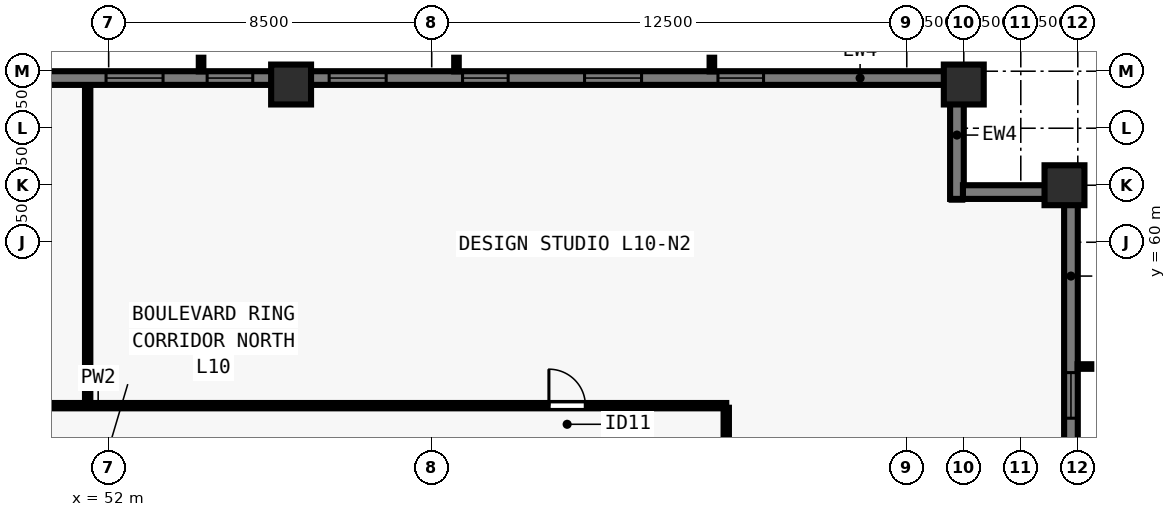
"""IFC4 building model, lengths in metres.
Left out: names, types, materials, properties, quantities, classifications, styles, units other than length and angle.
Written with IfcOpenShell. Run it as: python <this file> out.ifc"""

import sys

from ifc_helpers import new_model, si_unit, direction, frame, frame_2d, origin, origin_2d, place, context, subcontext, project, spatial, rectangle, extrude, element, fill, save


model = new_model("IFC4")
c1 = context("Model", 3, precision=1e-05, world=origin(), true_north=direction((0.0, 1.0)))
c2 = subcontext(c1, "Body", "Model", "MODEL_VIEW")
j1 = project(units=[si_unit("LENGTHUNIT", "METRE"), si_unit("PLANEANGLEUNIT", "RADIAN")], contexts=[c1])
p1 = place(None, origin())
s1 = spatial("IfcSite", under=j1, at=p1, CompositionType="ELEMENT")
p2 = place(p1, origin())
s2 = spatial("IfcBuilding", under=s1, at=p2, CompositionType="ELEMENT")
p3 = place(p2, frame((0.0, 0.0, 41.0)))
s3 = spatial("IfcBuildingStorey", under=s2, at=p3, CompositionType="ELEMENT", Elevation=41.0)
for number, where, z_axis, x_axis in (
    (1, (77.15, 61.5, 0.0), (0.0, 0.0, 1.0), (0.0, 1.0, 0.0)),
    (2, (74.5, 64.15, 0.0), (0.0, 0.0, 1.0), (1.0, 0.0, 0.0)),
    (3, (56.8, 64.15, 0.0), (0.0, 0.0, 1.0), (1.0, 0.0, 0.0)),
):
    element("IfcColumn", number, at=place(p3, frame(where, z_axis=z_axis, x_axis=x_axis)), inside=s3, PredefinedType="COLUMN", context=c2, shape_type="SweptSolid", body=[
        extrude(rectangle(XDim=1.05, YDim=1.05, at=origin_2d()), origin(), (0.0, 0.0, 1.0), 3.5),
    ])
p4 = place(p3, frame((29.5, 64.32, 0.0), z_axis=(0.0, 0.0, 1.0), x_axis=(1.0, 0.0, 0.0)))
e4 = element("IfcWall", 4, at=p4, inside=s3, PredefinedType="SOLIDWALL", context=c2, shape_type="SweptSolid", body=[
    extrude(rectangle(XDim=44.662, YDim=0.36, at=frame_2d((22.331, 0.0))), origin(), (0.0, 0.0, 1.0), 3.28),
])
p5 = place(p4, frame((4.93, 0.0, 0.8)))
e5 = element("IfcOpeningElement", 5, at=p5, cuts=e4, PredefinedType="OPENING", context=c2, shape_type="SweptSolid", body=[
    extrude(rectangle(XDim=1.2, YDim=1.544, at=frame_2d((0.6, 0.772))), frame((0.0, 0.19, 0.0), z_axis=(0.0, -1.0, 0.0), x_axis=(1.0, 0.0, 0.0)), (0.0, 0.0, 1.0), 0.38),
])
p6 = place(p4, frame((8.14, 0.0, 0.8)))
e6 = element("IfcOpeningElement", 6, at=p6, cuts=e4, PredefinedType="OPENING", context=c2, shape_type="SweptSolid", body=[
    extrude(rectangle(XDim=1.5, YDim=1.544, at=frame_2d((0.75, 0.772))), frame((0.0, 0.19, 0.0), z_axis=(0.0, -1.0, 0.0), x_axis=(1.0, 0.0, 0.0)), (0.0, 0.0, 1.0), 0.38),
])
p7 = place(p4, frame((11.65, 0.0, 0.8)))
e7 = element("IfcOpeningElement", 7, at=p7, cuts=e4, PredefinedType="OPENING", context=c2, shape_type="SweptSolid", body=[
    extrude(rectangle(XDim=1.2, YDim=1.544, at=frame_2d((0.6, 0.772))), frame((0.0, 0.19, 0.0), z_axis=(0.0, -1.0, 0.0), x_axis=(1.0, 0.0, 0.0)), (0.0, 0.0, 1.0), 0.38),
])
p8 = place(p4, frame((14.861, 0.0, 0.8)))
e8 = element("IfcOpeningElement", 8, at=p8, cuts=e4, PredefinedType="OPENING", context=c2, shape_type="SweptSolid", body=[
    extrude(rectangle(XDim=1.5, YDim=1.544, at=frame_2d((0.75, 0.772))), frame((0.0, 0.19, 0.0), z_axis=(0.0, -1.0, 0.0), x_axis=(1.0, 0.0, 0.0)), (0.0, 0.0, 1.0), 0.38),
])
p9 = place(p4, frame((18.821, 0.0, 0.8)))
e9 = element("IfcOpeningElement", 9, at=p9, cuts=e4, PredefinedType="OPENING", context=c2, shape_type="SweptSolid", body=[
    extrude(rectangle(XDim=1.2, YDim=1.544, at=frame_2d((0.6, 0.772))), frame((0.0, 0.19, 0.0), z_axis=(0.0, -1.0, 0.0), x_axis=(1.0, 0.0, 0.0)), (0.0, 0.0, 1.0), 0.38),
])
p10 = place(p4, frame((22.431, 0.0, 0.8)))
e10 = element("IfcOpeningElement", 10, at=p10, cuts=e4, PredefinedType="OPENING", context=c2, shape_type="SweptSolid", body=[
    extrude(rectangle(XDim=1.5, YDim=1.544, at=frame_2d((0.75, 0.772))), frame((0.0, 0.19, 0.0), z_axis=(0.0, -1.0, 0.0), x_axis=(1.0, 0.0, 0.0)), (0.0, 0.0, 1.0), 0.38),
])
p11 = place(p4, frame((25.091, 0.0, 0.8)))
e11 = element("IfcOpeningElement", 11, at=p11, cuts=e4, PredefinedType="OPENING", context=c2, shape_type="SweptSolid", body=[
    extrude(rectangle(XDim=1.2, YDim=1.544, at=frame_2d((0.6, 0.772))), frame((0.0, 0.19, 0.0), z_axis=(0.0, -1.0, 0.0), x_axis=(1.0, 0.0, 0.0)), (0.0, 0.0, 1.0), 0.38),
])
p12 = place(p4, frame((28.302, 0.0, 0.8)))
e12 = element("IfcOpeningElement", 12, at=p12, cuts=e4, PredefinedType="OPENING", context=c2, shape_type="SweptSolid", body=[
    extrude(rectangle(XDim=1.5, YDim=1.544, at=frame_2d((0.75, 0.772))), frame((0.0, 0.19, 0.0), z_axis=(0.0, -1.0, 0.0), x_axis=(1.0, 0.0, 0.0)), (0.0, 0.0, 1.0), 0.38),
])
p13 = place(p4, frame((31.812, 0.0, 0.8)))
e13 = element("IfcOpeningElement", 13, at=p13, cuts=e4, PredefinedType="OPENING", context=c2, shape_type="SweptSolid", body=[
    extrude(rectangle(XDim=1.2, YDim=1.544, at=frame_2d((0.6, 0.772))), frame((0.0, 0.19, 0.0), z_axis=(0.0, -1.0, 0.0), x_axis=(1.0, 0.0, 0.0)), (0.0, 0.0, 1.0), 0.38),
])
p14 = place(p4, frame((35.022, 0.0, 0.8)))
e14 = element("IfcOpeningElement", 14, at=p14, cuts=e4, PredefinedType="OPENING", context=c2, shape_type="SweptSolid", body=[
    extrude(rectangle(XDim=1.5, YDim=1.544, at=frame_2d((0.75, 0.772))), frame((0.0, 0.19, 0.0), z_axis=(0.0, -1.0, 0.0), x_axis=(1.0, 0.0, 0.0)), (0.0, 0.0, 1.0), 0.38),
])
p15 = place(p4, frame((38.532, 0.0, 0.8)))
e15 = element("IfcOpeningElement", 15, at=p15, cuts=e4, PredefinedType="OPENING", context=c2, shape_type="SweptSolid", body=[
    extrude(rectangle(XDim=1.2, YDim=1.544, at=frame_2d((0.6, 0.772))), frame((0.0, 0.19, 0.0), z_axis=(0.0, -1.0, 0.0), x_axis=(1.0, 0.0, 0.0)), (0.0, 0.0, 1.0), 0.38),
])
p16 = place(p3, frame((74.32, 64.5, 0.0), z_axis=(0.0, 0.0, 1.0), x_axis=(0.0, -1.0, 0.0)))
e16 = element("IfcWall", 16, at=p16, inside=s3, PredefinedType="SOLIDWALL", context=c2, shape_type="SweptSolid", body=[
    extrude(rectangle(XDim=3.36, YDim=0.36, at=frame_2d((1.68, 0.0))), origin(), (0.0, 0.0, 1.0), 3.28),
])
p17 = place(p3, frame((74.478, 61.32, 0.0), z_axis=(0.0, 0.0, 1.0), x_axis=(1.0, 0.0, 0.0)))
e17 = element("IfcWall", 17, at=p17, inside=s3, PredefinedType="SOLIDWALL", context=c2, shape_type="SweptSolid", body=[
    extrude(rectangle(XDim=2.684, YDim=0.36, at=frame_2d((1.342, 0.0))), origin(), (0.0, 0.0, 1.0), 3.28),
])
p18 = place(p3, frame((77.32, 61.5, 0.0), z_axis=(0.0, 0.0, 1.0), x_axis=(0.0, -1.0, 0.0)))
e18 = element("IfcWall", 18, at=p18, inside=s3, PredefinedType="SOLIDWALL", context=c2, shape_type="SweptSolid", body=[
    extrude(rectangle(XDim=44.662, YDim=0.36, at=frame_2d((22.331, 0.0))), origin(), (0.0, 0.0, 1.0), 3.28),
])
p19 = place(p18, frame((4.93, 0.0, 0.8)))
e19 = element("IfcOpeningElement", 19, at=p19, cuts=e18, PredefinedType="OPENING", context=c2, shape_type="SweptSolid", body=[
    extrude(rectangle(XDim=1.2, YDim=1.544, at=frame_2d((0.6, 0.772))), frame((0.0, 0.19, 0.0), z_axis=(0.0, -1.0, 0.0), x_axis=(1.0, 0.0, 0.0)), (0.0, 0.0, 1.0), 0.38),
])
p20 = place(p18, frame((8.14, 0.0, 0.8)))
e20 = element("IfcOpeningElement", 20, at=p20, cuts=e18, PredefinedType="OPENING", context=c2, shape_type="SweptSolid", body=[
    extrude(rectangle(XDim=1.5, YDim=1.544, at=frame_2d((0.75, 0.772))), frame((0.0, 0.19, 0.0), z_axis=(0.0, -1.0, 0.0), x_axis=(1.0, 0.0, 0.0)), (0.0, 0.0, 1.0), 0.38),
])
p21 = place(p18, frame((11.65, 0.0, 0.8)))
e21 = element("IfcOpeningElement", 21, at=p21, cuts=e18, PredefinedType="OPENING", context=c2, shape_type="SweptSolid", body=[
    extrude(rectangle(XDim=1.2, YDim=1.544, at=frame_2d((0.6, 0.772))), frame((0.0, 0.19, 0.0), z_axis=(0.0, -1.0, 0.0), x_axis=(1.0, 0.0, 0.0)), (0.0, 0.0, 1.0), 0.38),
])
p22 = place(p18, frame((15.311, 0.0, 0.8)))
e22 = element("IfcOpeningElement", 22, at=p22, cuts=e18, PredefinedType="OPENING", context=c2, shape_type="SweptSolid", body=[
    extrude(rectangle(XDim=1.5, YDim=1.544, at=frame_2d((0.75, 0.772))), frame((0.0, 0.19, 0.0), z_axis=(0.0, -1.0, 0.0), x_axis=(1.0, 0.0, 0.0)), (0.0, 0.0, 1.0), 0.38),
])
p23 = place(p18, frame((18.821, 0.0, 0.8)))
e23 = element("IfcOpeningElement", 23, at=p23, cuts=e18, PredefinedType="OPENING", context=c2, shape_type="SweptSolid", body=[
    extrude(rectangle(XDim=1.2, YDim=1.544, at=frame_2d((0.6, 0.772))), frame((0.0, 0.19, 0.0), z_axis=(0.0, -1.0, 0.0), x_axis=(1.0, 0.0, 0.0)), (0.0, 0.0, 1.0), 0.38),
])
p24 = place(p18, frame((20.331, 0.0, 0.8)))
e24 = element("IfcOpeningElement", 24, at=p24, cuts=e18, PredefinedType="OPENING", context=c2, shape_type="SweptSolid", body=[
    extrude(rectangle(XDim=1.5, YDim=1.544, at=frame_2d((0.75, 0.772))), frame((0.0, 0.19, 0.0), z_axis=(0.0, -1.0, 0.0), x_axis=(1.0, 0.0, 0.0)), (0.0, 0.0, 1.0), 0.38),
])
p25 = place(p18, frame((25.091, 0.0, 0.8)))
e25 = element("IfcOpeningElement", 25, at=p25, cuts=e18, PredefinedType="OPENING", context=c2, shape_type="SweptSolid", body=[
    extrude(rectangle(XDim=1.2, YDim=1.544, at=frame_2d((0.6, 0.772))), frame((0.0, 0.19, 0.0), z_axis=(0.0, -1.0, 0.0), x_axis=(1.0, 0.0, 0.0)), (0.0, 0.0, 1.0), 0.38),
])
p26 = place(p18, frame((28.302, 0.0, 0.8)))
e26 = element("IfcOpeningElement", 26, at=p26, cuts=e18, PredefinedType="OPENING", context=c2, shape_type="SweptSolid", body=[
    extrude(rectangle(XDim=1.5, YDim=1.544, at=frame_2d((0.75, 0.772))), frame((0.0, 0.19, 0.0), z_axis=(0.0, -1.0, 0.0), x_axis=(1.0, 0.0, 0.0)), (0.0, 0.0, 1.0), 0.38),
])
p27 = place(p18, frame((31.812, 0.0, 0.8)))
e27 = element("IfcOpeningElement", 27, at=p27, cuts=e18, PredefinedType="OPENING", context=c2, shape_type="SweptSolid", body=[
    extrude(rectangle(XDim=1.2, YDim=1.544, at=frame_2d((0.6, 0.772))), frame((0.0, 0.19, 0.0), z_axis=(0.0, -1.0, 0.0), x_axis=(1.0, 0.0, 0.0)), (0.0, 0.0, 1.0), 0.38),
])
p28 = place(p18, frame((35.022, 0.0, 0.8)))
e28 = element("IfcOpeningElement", 28, at=p28, cuts=e18, PredefinedType="OPENING", context=c2, shape_type="SweptSolid", body=[
    extrude(rectangle(XDim=1.5, YDim=1.544, at=frame_2d((0.75, 0.772))), frame((0.0, 0.19, 0.0), z_axis=(0.0, -1.0, 0.0), x_axis=(1.0, 0.0, 0.0)), (0.0, 0.0, 1.0), 0.38),
])
p29 = place(p18, frame((38.532, 0.0, 0.8)))
e29 = element("IfcOpeningElement", 29, at=p29, cuts=e18, PredefinedType="OPENING", context=c2, shape_type="SweptSolid", body=[
    extrude(rectangle(XDim=1.2, YDim=1.544, at=frame_2d((0.6, 0.772))), frame((0.0, 0.19, 0.0), z_axis=(0.0, -1.0, 0.0), x_axis=(1.0, 0.0, 0.0)), (0.0, 0.0, 1.0), 0.38),
])
p30 = place(p3, frame((35.75, 55.7, 0.0), z_axis=(0.0, 0.0, 1.0), x_axis=(1.0, 0.0, 0.0)))
e30 = element("IfcWall", 30, at=p30, inside=s3, PredefinedType="PARTITIONING", context=c2, shape_type="SweptSolid", body=[
    extrude(rectangle(XDim=32.5, YDim=0.14, at=frame_2d((16.25, 0.0))), origin(), (0.0, 0.0, 1.0), 3.28),
])
p31 = place(p30, frame((3.154, 0.0, 0.0)))
e31 = element("IfcOpeningElement", 31, at=p31, cuts=e30, PredefinedType="OPENING", context=c2, shape_type="SweptSolid", body=[
    extrude(rectangle(XDim=0.96, YDim=2.12, at=frame_2d((0.48, 1.06))), frame((0.0, 0.08, 0.0), z_axis=(0.0, -1.0, 0.0), x_axis=(1.0, 0.0, 0.0)), (0.0, 0.0, 1.0), 0.16),
])
p32 = place(p30, frame((27.834, 0.0, 0.0)))
e32 = element("IfcOpeningElement", 32, at=p32, cuts=e30, PredefinedType="OPENING", context=c2, shape_type="SweptSolid", body=[
    extrude(rectangle(XDim=0.96, YDim=2.12, at=frame_2d((0.48, 1.06))), frame((0.0, 0.08, 0.0), z_axis=(0.0, -1.0, 0.0), x_axis=(1.0, 0.0, 0.0)), (0.0, 0.0, 1.0), 0.16),
])
p33 = place(p3, frame((68.25, 22.355, 0.0), z_axis=(0.0, 0.0, 1.0), x_axis=(0.0, 1.0, 0.0)))
e33 = element("IfcWall", 33, at=p33, inside=s3, PredefinedType="PARTITIONING", context=c2, shape_type="SweptSolid", body=[
    extrude(rectangle(XDim=33.29, YDim=0.14, at=frame_2d((16.645, 0.0))), origin(), (0.0, 0.0, 1.0), 3.28),
])
p34 = place(p33, frame((3.522, 0.0, 0.0)))
e34 = element("IfcOpeningElement", 34, at=p34, cuts=e33, PredefinedType="OPENING", context=c2, shape_type="SweptSolid", body=[
    extrude(rectangle(XDim=0.96, YDim=2.12, at=frame_2d((0.48, 1.06))), frame((0.0, 0.08, 0.0), z_axis=(0.0, -1.0, 0.0), x_axis=(1.0, 0.0, 0.0)), (0.0, 0.0, 1.0), 0.16),
])
p35 = place(p33, frame((11.956, 0.0, 0.0)))
e35 = element("IfcOpeningElement", 35, at=p35, cuts=e33, PredefinedType="OPENING", context=c2, shape_type="SweptSolid", body=[
    extrude(rectangle(XDim=0.96, YDim=2.12, at=frame_2d((0.48, 1.06))), frame((0.0, 0.08, 0.0), z_axis=(0.0, -1.0, 0.0), x_axis=(1.0, 0.0, 0.0)), (0.0, 0.0, 1.0), 0.16),
])
p36 = place(p33, frame((20.256, 0.0, 0.0)))
e36 = element("IfcOpeningElement", 36, at=p36, cuts=e33, PredefinedType="OPENING", context=c2, shape_type="SweptSolid", body=[
    extrude(rectangle(XDim=0.96, YDim=2.12, at=frame_2d((0.48, 1.06))), frame((0.0, 0.08, 0.0), z_axis=(0.0, -1.0, 0.0), x_axis=(1.0, 0.0, 0.0)), (0.0, 0.0, 1.0), 0.16),
])
p37 = place(p33, frame((28.422, 0.0, 0.0)))
e37 = element("IfcOpeningElement", 37, at=p37, cuts=e33, PredefinedType="OPENING", context=c2, shape_type="SweptSolid", body=[
    extrude(rectangle(XDim=0.96, YDim=2.12, at=frame_2d((0.48, 1.06))), frame((0.0, 0.08, 0.0), z_axis=(0.0, -1.0, 0.0), x_axis=(1.0, 0.0, 0.0)), (0.0, 0.0, 1.0), 0.16),
])
p38 = place(p3, frame((51.448, 55.8, 0.0), z_axis=(0.0, 0.0, 1.0), x_axis=(0.0, 1.0, 0.0)))
e38 = element("IfcWall", 38, at=p38, inside=s3, PredefinedType="PARTITIONING", context=c2, shape_type="SweptSolid", body=[
    extrude(rectangle(XDim=8.28, YDim=0.14, at=frame_2d((4.14, 0.0))), origin(), (0.0, 0.0, 1.0), 3.28),
])
p39 = place(p10, origin())
e39 = element("IfcWindow", 39, at=p39, inside=s3, PartitioningType="SINGLE_PANEL", PredefinedType="WINDOW", context=c2, shape_type="SweptSolid", body=[
    extrude(rectangle(XDim=1.5, YDim=1.544, at=frame_2d((0.75, 0.772))), frame((0.0, -0.05, 0.0), z_axis=(0.0, -1.0, 0.0), x_axis=(1.0, 0.0, 0.0)), (0.0, 0.0, 1.0), 0.06),
])
fill(e10, e39)
p40 = place(p11, origin())
e40 = element("IfcWindow", 40, at=p40, inside=s3, PartitioningType="SINGLE_PANEL", PredefinedType="WINDOW", context=c2, shape_type="SweptSolid", body=[
    extrude(rectangle(XDim=1.2, YDim=1.544, at=frame_2d((0.6, 0.772))), frame((0.0, -0.05, 0.0), z_axis=(0.0, -1.0, 0.0), x_axis=(1.0, 0.0, 0.0)), (0.0, 0.0, 1.0), 0.06),
])
fill(e11, e40)
p41 = place(p12, origin())
e41 = element("IfcWindow", 41, at=p41, inside=s3, PartitioningType="SINGLE_PANEL", PredefinedType="WINDOW", context=c2, shape_type="SweptSolid", body=[
    extrude(rectangle(XDim=1.5, YDim=1.544, at=frame_2d((0.75, 0.772))), frame((0.0, -0.05, 0.0), z_axis=(0.0, -1.0, 0.0), x_axis=(1.0, 0.0, 0.0)), (0.0, 0.0, 1.0), 0.06),
])
fill(e12, e41)
p42 = place(p13, origin())
e42 = element("IfcWindow", 42, at=p42, inside=s3, PartitioningType="SINGLE_PANEL", PredefinedType="WINDOW", context=c2, shape_type="SweptSolid", body=[
    extrude(rectangle(XDim=1.2, YDim=1.544, at=frame_2d((0.6, 0.772))), frame((0.0, -0.05, 0.0), z_axis=(0.0, -1.0, 0.0), x_axis=(1.0, 0.0, 0.0)), (0.0, 0.0, 1.0), 0.06),
])
fill(e13, e42)
p43 = place(p14, origin())
e43 = element("IfcWindow", 43, at=p43, inside=s3, PartitioningType="SINGLE_PANEL", PredefinedType="WINDOW", context=c2, shape_type="SweptSolid", body=[
    extrude(rectangle(XDim=1.5, YDim=1.544, at=frame_2d((0.75, 0.772))), frame((0.0, -0.05, 0.0), z_axis=(0.0, -1.0, 0.0), x_axis=(1.0, 0.0, 0.0)), (0.0, 0.0, 1.0), 0.06),
])
fill(e14, e43)
p44 = place(p15, origin())
e44 = element("IfcWindow", 44, at=p44, inside=s3, PartitioningType="SINGLE_PANEL", PredefinedType="WINDOW", context=c2, shape_type="SweptSolid", body=[
    extrude(rectangle(XDim=1.2, YDim=1.544, at=frame_2d((0.6, 0.772))), frame((0.0, -0.05, 0.0), z_axis=(0.0, -1.0, 0.0), x_axis=(1.0, 0.0, 0.0)), (0.0, 0.0, 1.0), 0.06),
])
fill(e15, e44)
p45 = place(p19, origin())
e45 = element("IfcWindow", 45, at=p45, inside=s3, PartitioningType="SINGLE_PANEL", PredefinedType="WINDOW", context=c2, shape_type="SweptSolid", body=[
    extrude(rectangle(XDim=1.2, YDim=1.544, at=frame_2d((0.6, 0.772))), frame((0.0, -0.05, 0.0), z_axis=(0.0, -1.0, 0.0), x_axis=(1.0, 0.0, 0.0)), (0.0, 0.0, 1.0), 0.06),
])
fill(e19, e45)
p46 = place(p32, origin())
e46 = element("IfcDoor", 46, at=p46, inside=s3, OperationType="SINGLE_SWING_LEFT", PredefinedType="DOOR", context=c2, shape_type="SweptSolid", body=[
    extrude(rectangle(XDim=0.96, YDim=2.12, at=frame_2d((0.48, 1.06))), frame((0.0, 0.025, 0.0), z_axis=(0.0, -1.0, 0.0), x_axis=(1.0, 0.0, 0.0)), (0.0, 0.0, 1.0), 0.05),
])
fill(e32, e46)
save(model, sys.argv[1])
